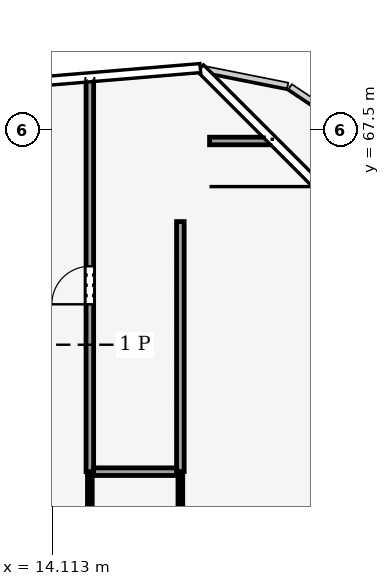
"""IFC4 building model, lengths in metres.
Left out: names, types, materials, properties, quantities, classifications, styles, units other than length and angle.
Written with IfcOpenShell. Run it as: python <this file> out.ifc"""

import sys

from ifc_helpers import new_model, si_unit, direction, frame, frame_2d, origin, origin_2d, place, context, subcontext, project, spatial, rectangle, hollow_rectangle, extrude, element, fill, save


model = new_model("IFC4")
c1 = context("Model", 3, precision=1e-05, world=origin(), true_north=direction((0.0, 1.0)))
c2 = subcontext(c1, "Body", "Model", "MODEL_VIEW")
j1 = project(units=[si_unit("LENGTHUNIT", "METRE"), si_unit("PLANEANGLEUNIT", "RADIAN")], contexts=[c1])
p1 = place(None, origin())
s1 = spatial("IfcSite", under=j1, at=p1, CompositionType="ELEMENT")
p2 = place(p1, origin())
s2 = spatial("IfcBuilding", under=s1, at=p2, CompositionType="ELEMENT")
p3 = place(p2, frame((0.0, 0.0, 282.0)))
s3 = spatial("IfcBuildingStorey", under=s2, at=p3, CompositionType="ELEMENT", Elevation=282.0)
p4 = place(p3, frame((21.0, 66.0, 0.223), z_axis=(-0.386877430339, 0.0, 0.922131147882), x_axis=(0.0, -1.0, 0.0)))
e1 = element("IfcColumn", 1, at=p4, inside=s3, PredefinedType="COLUMN", context=c2, shape_type="SweptSolid", body=[
    extrude(hollow_rectangle(XDim=1.0, YDim=1.0, WallThickness=0.045, at=origin_2d()), origin(), (0.0, 0.0, 1.0), 7.108),
])
p5 = place(p3, frame((15.1, 48.449, 0.0), z_axis=(0.0, 0.0, 1.0), x_axis=(0.0, 1.0, 0.0)))
e2 = element("IfcWall", 2, at=p5, inside=s3, PredefinedType="PARTITIONING", context=c2, shape_type="SweptSolid", body=[
    extrude(rectangle(XDim=10.049, YDim=0.125, at=frame_2d((5.024, 0.0))), origin(), (0.0, 0.0, 1.0), 6.35),
])
p6 = place(p5, frame((4.125, 0.0, 0.0)))
e3 = element("IfcOpeningElement", 3, at=p6, cuts=e2, PredefinedType="OPENING", context=c2, shape_type="SweptSolid", body=[
    extrude(rectangle(XDim=1.8, YDim=2.4, at=frame_2d((0.9, 1.2))), frame((0.0, 0.073, 0.0), z_axis=(0.0, -1.0, 0.0), x_axis=(1.0, 0.0, 0.0)), (0.0, 0.0, 1.0), 0.145),
])
p7 = place(p3, frame((15.1, 58.498, 0.0), z_axis=(0.0, 0.0, 1.0), x_axis=(0.0, 1.0, 0.0)))
e4 = element("IfcWall", 4, at=p7, inside=s3, PredefinedType="PARTITIONING", context=c2, shape_type="SweptSolid", body=[
    extrude(rectangle(XDim=10.34, YDim=0.2, at=frame_2d((5.17, 0.0))), origin(), (0.0, 0.0, 1.0), 6.04),
])
p8 = place(p7, frame((4.405, 0.0, 0.0)))
e5 = element("IfcOpeningElement", 5, at=p8, cuts=e4, PredefinedType="OPENING", context=c2, shape_type="SweptSolid", body=[
    extrude(rectangle(XDim=1.0, YDim=2.1, at=frame_2d((0.5, 1.05))), frame((0.0, 0.11, 0.0), z_axis=(0.0, -1.0, 0.0), x_axis=(1.0, 0.0, 0.0)), (0.0, 0.0, 1.0), 0.22),
])
p9 = place(p3, frame((15.2, 58.498, 0.0), z_axis=(0.0, 0.0, 1.0), x_axis=(1.0, 0.0, 0.0)))
e6 = element("IfcWall", 6, at=p9, inside=s3, PredefinedType="PARTITIONING", context=c2, shape_type="SweptSolid", body=[
    extrude(rectangle(XDim=2.282, YDim=0.2, at=frame_2d((1.141, 0.0))), origin(), (0.0, 0.0, 1.0), 6.24),
])
p10 = place(p3, frame((17.482, 58.496, 0.0), z_axis=(0.0, 0.0, 1.0), x_axis=(0.0, -1.0, 0.0)))
e7 = element("IfcWall", 7, at=p10, inside=s3, PredefinedType="PARTITIONING", context=c2, shape_type="SweptSolid", body=[
    extrude(rectangle(XDim=10.045, YDim=0.125, at=frame_2d((5.022, 0.0))), origin(), (0.0, 0.0, 1.0), 6.35),
])
p11 = place(p3, frame((19.9, 67.2, 0.0), z_axis=(0.0, 0.0, 1.0), x_axis=(-1.0, 0.0, 0.0)))
e8 = element("IfcWall", 8, at=p11, inside=s3, PredefinedType="PARTITIONING", context=c2, shape_type="SweptSolid", body=[
    extrude(rectangle(XDim=1.65, YDim=0.2, at=frame_2d((0.825, 0.0))), origin(), (0.0, 0.0, 1.0), 6.87),
])
p12 = place(p3, frame((17.482, 65.079, 0.0), z_axis=(0.0, 0.0, 1.0), x_axis=(0.0, -1.0, 0.0)))
e9 = element("IfcWall", 9, at=p12, inside=s3, PredefinedType="PARTITIONING", context=c2, shape_type="SweptSolid", body=[
    extrude(rectangle(XDim=6.579, YDim=0.2, at=frame_2d((3.29, 0.0))), origin(), (0.0, 0.0, 1.0), 6.87),
])
p13 = place(p8, origin())
e10 = element("IfcDoor", 10, at=p13, inside=s3, OperationType="SINGLE_SWING_LEFT", PredefinedType="DOOR", context=c2, shape_type="SweptSolid", body=[
    extrude(rectangle(XDim=1.0, YDim=2.1, at=frame_2d((0.5, 1.05))), frame((0.0, 0.025, 0.0), z_axis=(0.0, -1.0, 0.0), x_axis=(1.0, 0.0, 0.0)), (0.0, 0.0, 1.0), 0.05),
])
fill(e5, e10)
save(model, sys.argv[1])
